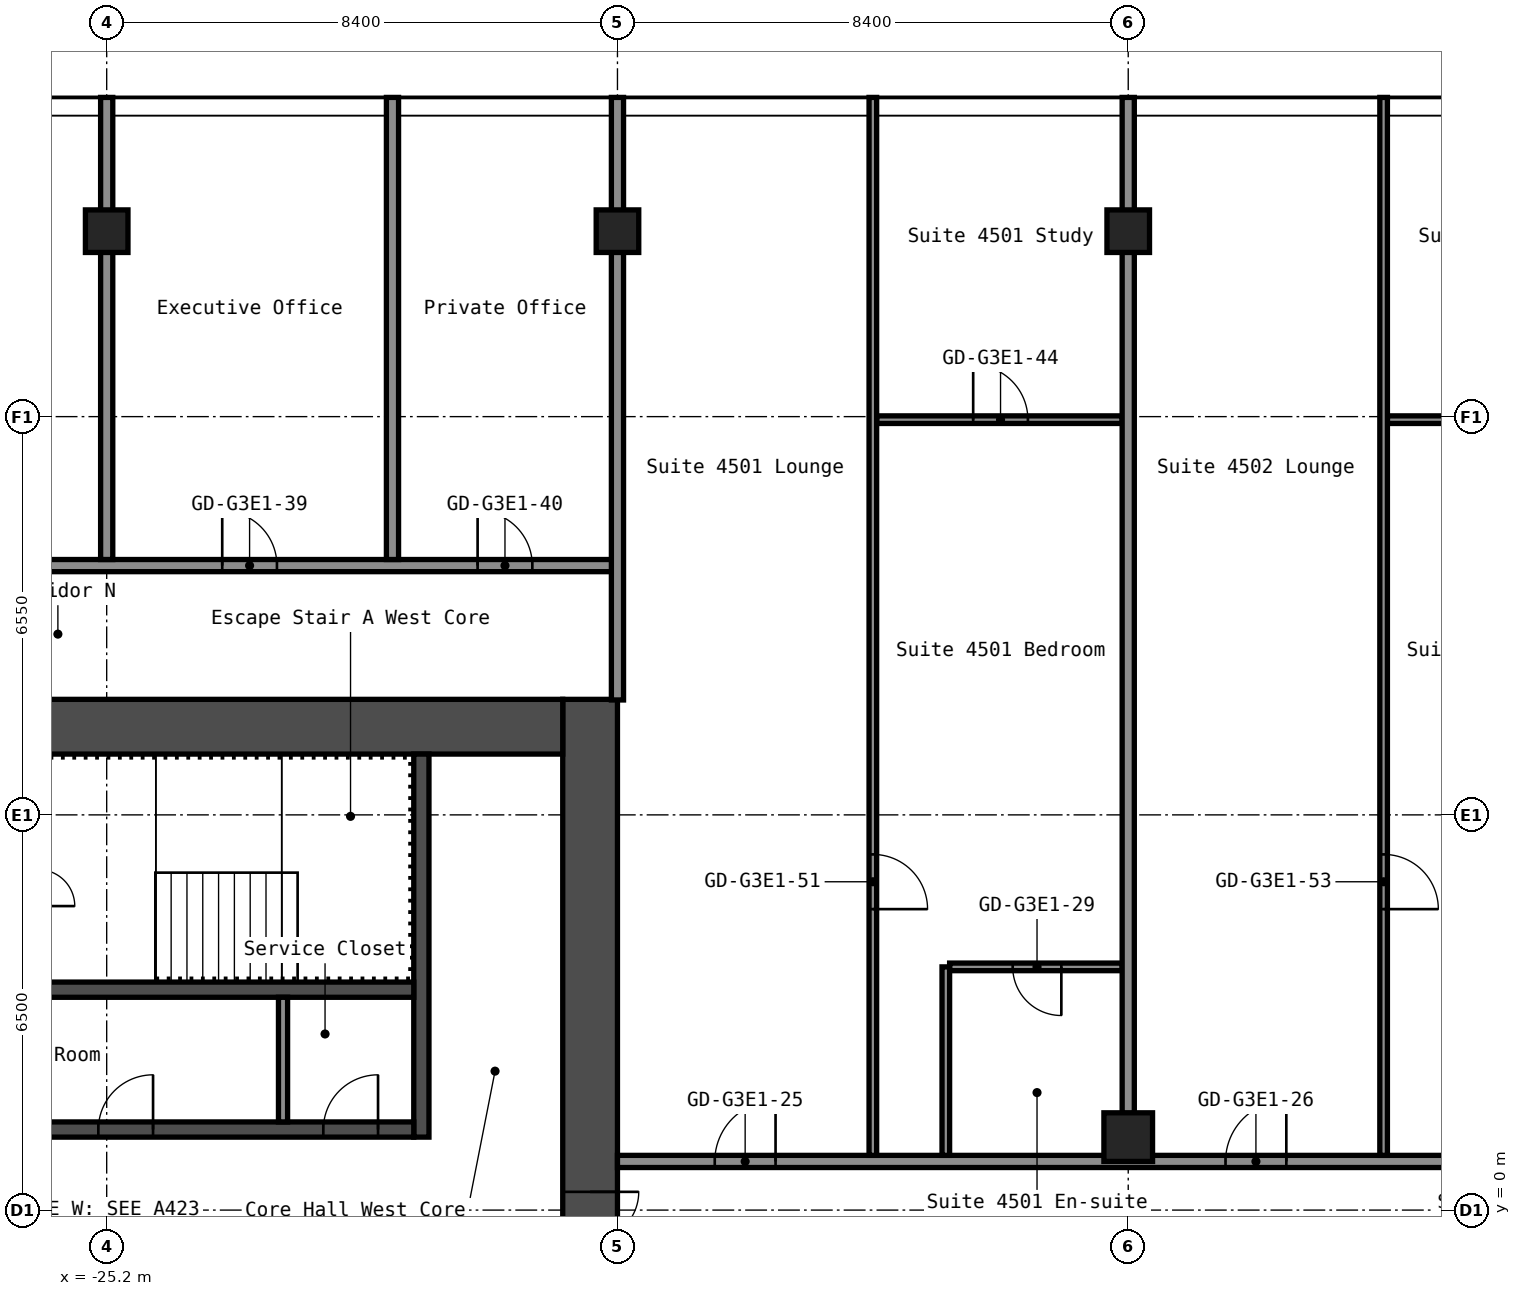
"""IFC4 building model, lengths in metres.
Left out: names, types, materials, properties, quantities, classifications, styles, units other than length and angle.
Written with IfcOpenShell. Run it as: python <this file> out.ifc"""

import sys

from ifc_helpers import new_model, si_unit, direction, frame, frame_2d, origin, origin_2d, place, context, subcontext, project, spatial, rectangle, hollow_rectangle, extrude, element, fill, save


model = new_model("IFC4")
c1 = context("Model", 3, precision=1e-05, world=origin(), true_north=direction((0.0, 1.0)))
c2 = subcontext(c1, "Body", "Model", "MODEL_VIEW")
j1 = project(units=[si_unit("LENGTHUNIT", "METRE"), si_unit("PLANEANGLEUNIT", "RADIAN")], contexts=[c1])
p1 = place(None, origin())
s1 = spatial("IfcSite", under=j1, at=p1, CompositionType="ELEMENT")
p2 = place(p1, origin())
s2 = spatial("IfcBuilding", under=s1, at=p2, CompositionType="ELEMENT")
p3 = place(p2, frame((0.0, 0.0, 159.8)))
s3 = spatial("IfcBuildingStorey", under=s2, at=p3, CompositionType="ELEMENT", Elevation=159.8)
for number, where, z_axis, x_axis in (
    (1, (-25.2, 16.1, 0.0), (0.0, 0.0, 1.0), (1.0, 0.0, 0.0)),
    (2, (-16.8, 16.1, 0.0), (0.0, 0.0, 1.0), (1.0, 0.0, 0.0)),
):
    element("IfcColumn", number, at=place(p3, frame(where, z_axis=z_axis, x_axis=x_axis)), inside=s3, PredefinedType="COLUMN", context=c2, shape_type="SweptSolid", body=[
        extrude(hollow_rectangle(XDim=0.7, YDim=0.7, WallThickness=0.028, at=origin_2d()), origin(), (0.0, 0.0, 1.0), 2.75),
    ])
p4 = place(p3, frame((-8.4, 1.2, 0.0), z_axis=(0.0, 0.0, 1.0), x_axis=(1.0, 0.0, 0.0)))
e3 = element("IfcColumn", 3, at=p4, inside=s3, PredefinedType="COLUMN", context=c2, shape_type="SweptSolid", body=[
    extrude(hollow_rectangle(XDim=0.8, YDim=0.8, WallThickness=0.032, at=origin_2d()), origin(), (0.0, 0.0, 1.0), 2.75),
])
p5 = place(p3, frame((-8.4, 16.1, 0.0), z_axis=(0.0, 0.0, 1.0), x_axis=(1.0, 0.0, 0.0)))
e4 = element("IfcColumn", 4, at=p5, inside=s3, PredefinedType="COLUMN", context=c2, shape_type="SweptSolid", body=[
    extrude(hollow_rectangle(XDim=0.7, YDim=0.7, WallThickness=0.028, at=origin_2d()), origin(), (0.0, 0.0, 1.0), 2.75),
])
p6 = place(p3, frame((-17.25, -8.4, 0.0), z_axis=(0.0, 0.0, 1.0), x_axis=(0.0, 1.0, 0.0)))
e5 = element("IfcWall", 5, at=p6, inside=s3, PredefinedType="SHEAR", context=c2, shape_type="SweptSolid", body=[
    extrude(rectangle(XDim=16.8, YDim=0.9, at=frame_2d((8.4, 0.0))), origin(), (0.0, 0.0, 1.0), 2.75),
])
p7 = place(p6, frame((7.1, 0.0, 0.0)))
e6 = element("IfcOpeningElement", 6, at=p7, cuts=e5, PredefinedType="OPENING", context=c2, shape_type="SweptSolid", body=[
    extrude(rectangle(XDim=1.6, YDim=2.1, at=frame_2d((0.8, 1.05))), frame((0.0, 0.46, 0.0), z_axis=(0.0, -1.0, 0.0), x_axis=(1.0, 0.0, 0.0)), (0.0, 0.0, 1.0), 0.92),
])
p8 = place(p3, frame((-32.7, 7.95, 0.0), z_axis=(0.0, 0.0, 1.0), x_axis=(1.0, 0.0, 0.0)))
e7 = element("IfcWall", 7, at=p8, inside=s3, PredefinedType="SHEAR", context=c2, shape_type="SweptSolid", body=[
    extrude(rectangle(XDim=15.0, YDim=0.9, at=frame_2d((7.5, 0.0))), origin(), (0.0, 0.0, 1.0), 2.75),
])
p9 = place(p8, frame((3.4, 0.0, 0.0)))
e8 = element("IfcOpeningElement", 8, at=p9, cuts=e7, PredefinedType="OPENING", context=c2, shape_type="SweptSolid", body=[
    extrude(rectangle(XDim=1.2, YDim=2.1, at=frame_2d((0.6, 1.05))), frame((0.0, 0.46, 0.0), z_axis=(0.0, -1.0, 0.0), x_axis=(1.0, 0.0, 0.0)), (0.0, 0.0, 1.0), 0.92),
])
p10 = place(p8, frame((0.75, 0.0, 0.0)))
e9 = element("IfcOpeningElement", 9, at=p10, cuts=e7, PredefinedType="OPENING", context=c2, shape_type="SweptSolid", body=[
    extrude(rectangle(XDim=0.9, YDim=2.1, at=frame_2d((0.45, 1.05))), frame((0.0, 0.46, 0.0), z_axis=(0.0, -1.0, 0.0), x_axis=(1.0, 0.0, 0.0)), (0.0, 0.0, 1.0), 0.92),
])
p11 = place(p3, frame((-20.025, 1.2, 0.0), z_axis=(0.0, 0.0, 1.0), x_axis=(0.0, 1.0, 0.0)))
e10 = element("IfcWall", 10, at=p11, inside=s3, PredefinedType="SHEAR", context=c2, shape_type="SweptSolid", body=[
    extrude(rectangle(XDim=6.3, YDim=0.25, at=frame_2d((3.15, 0.0))), origin(), (0.0, 0.0, 1.0), 2.75),
])
p12 = place(p3, frame((-27.65, 1.325, 0.0), z_axis=(0.0, 0.0, 1.0), x_axis=(1.0, 0.0, 0.0)))
e11 = element("IfcWall", 11, at=p12, inside=s3, PredefinedType="SHEAR", context=c2, shape_type="SweptSolid", body=[
    extrude(rectangle(XDim=7.5, YDim=0.25, at=frame_2d((3.75, 0.0))), origin(), (0.0, 0.0, 1.0), 2.75),
])
p13 = place(p12, frame((6.012, 0.0, 0.0)))
e12 = element("IfcOpeningElement", 12, at=p13, cuts=e11, PredefinedType="OPENING", context=c2, shape_type="SweptSolid", body=[
    extrude(rectangle(XDim=0.9, YDim=2.1, at=frame_2d((0.45, 1.05))), frame((0.0, 0.135, 0.0), z_axis=(0.0, -1.0, 0.0), x_axis=(1.0, 0.0, 0.0)), (0.0, 0.0, 1.0), 0.27),
])
p14 = place(p12, frame((2.312, 0.0, 0.0)))
e13 = element("IfcOpeningElement", 13, at=p14, cuts=e11, PredefinedType="OPENING", context=c2, shape_type="SweptSolid", body=[
    extrude(rectangle(XDim=0.9, YDim=2.1, at=frame_2d((0.45, 1.05))), frame((0.0, 0.135, 0.0), z_axis=(0.0, -1.0, 0.0), x_axis=(1.0, 0.0, 0.0)), (0.0, 0.0, 1.0), 0.27),
])
p15 = place(p3, frame((-27.65, 3.625, 0.0), z_axis=(0.0, 0.0, 1.0), x_axis=(1.0, 0.0, 0.0)))
e14 = element("IfcWall", 14, at=p15, inside=s3, PredefinedType="SHEAR", context=c2, shape_type="SweptSolid", body=[
    extrude(rectangle(XDim=7.5, YDim=0.25, at=frame_2d((3.75, 0.0))), origin(), (0.0, 0.0, 1.0), 2.75),
])
p16 = place(p3, frame((-22.3, 1.45, 0.0), z_axis=(0.0, 0.0, 1.0), x_axis=(0.0, 1.0, 0.0)))
e15 = element("IfcWall", 15, at=p16, inside=s3, PredefinedType="PARTITIONING", context=c2, shape_type="SweptSolid", body=[
    extrude(rectangle(XDim=2.05, YDim=0.15, at=frame_2d((1.025, 0.0))), origin(), (0.0, 0.0, 1.0), 2.75),
])
p17 = place(p3, frame((-16.8, 0.8, 0.0), z_axis=(0.0, 0.0, 1.0), x_axis=(1.0, 0.0, 0.0)))
e16 = element("IfcWall", 16, at=p17, inside=s3, PredefinedType="PARTITIONING", context=c2, shape_type="SweptSolid", body=[
    extrude(rectangle(XDim=33.6, YDim=0.2, at=frame_2d((16.8, 0.0))), origin(), (0.0, 0.0, 1.0), 2.75),
])
p18 = place(p17, frame((1.6, 0.0, 0.0)))
e17 = element("IfcOpeningElement", 17, at=p18, cuts=e16, PredefinedType="OPENING", context=c2, shape_type="SweptSolid", body=[
    extrude(rectangle(XDim=1.0, YDim=2.1, at=frame_2d((0.5, 1.05))), frame((0.0, 0.11, 0.0), z_axis=(0.0, -1.0, 0.0), x_axis=(1.0, 0.0, 0.0)), (0.0, 0.0, 1.0), 0.22),
])
p19 = place(p17, frame((10.0, 0.0, 0.0)))
e18 = element("IfcOpeningElement", 18, at=p19, cuts=e16, PredefinedType="OPENING", context=c2, shape_type="SweptSolid", body=[
    extrude(rectangle(XDim=1.0, YDim=2.1, at=frame_2d((0.5, 1.05))), frame((0.0, 0.11, 0.0), z_axis=(0.0, -1.0, 0.0), x_axis=(1.0, 0.0, 0.0)), (0.0, 0.0, 1.0), 0.22),
])
p20 = place(p17, frame((22.6, 0.0, 0.0)))
e19 = element("IfcOpeningElement", 19, at=p20, cuts=e16, PredefinedType="OPENING", context=c2, shape_type="SweptSolid", body=[
    extrude(rectangle(XDim=1.0, YDim=2.1, at=frame_2d((0.5, 1.05))), frame((0.0, 0.11, 0.0), z_axis=(0.0, -1.0, 0.0), x_axis=(1.0, 0.0, 0.0)), (0.0, 0.0, 1.0), 0.22),
])
p21 = place(p17, frame((27.1, 0.0, 0.0)))
e20 = element("IfcOpeningElement", 20, at=p21, cuts=e16, PredefinedType="OPENING", context=c2, shape_type="SweptSolid", body=[
    extrude(rectangle(XDim=1.0, YDim=2.1, at=frame_2d((0.5, 1.05))), frame((0.0, 0.11, 0.0), z_axis=(0.0, -1.0, 0.0), x_axis=(1.0, 0.0, 0.0)), (0.0, 0.0, 1.0), 0.22),
])
p22 = place(p3, frame((-11.337, 4.0, 0.0), z_axis=(0.0, 0.0, 1.0), x_axis=(1.0, 0.0, 0.0)))
e21 = element("IfcWall", 21, at=p22, inside=s3, PredefinedType="PARTITIONING", context=c2, shape_type="SweptSolid", body=[
    extrude(rectangle(XDim=2.837, YDim=0.125, at=frame_2d((1.419, 0.0))), origin(), (0.0, 0.0, 1.0), 2.75),
])
p23 = place(p22, frame((1.038, 0.0, 0.0)))
e22 = element("IfcOpeningElement", 22, at=p23, cuts=e21, PredefinedType="OPENING", context=c2, shape_type="SweptSolid", body=[
    extrude(rectangle(XDim=0.8, YDim=2.1, at=frame_2d((0.4, 1.05))), frame((0.0, 0.073, 0.0), z_axis=(0.0, -1.0, 0.0), x_axis=(1.0, 0.0, 0.0)), (0.0, 0.0, 1.0), 0.145),
])
p24 = place(p3, frame((-42.7, 10.6, 0.0), z_axis=(0.0, 0.0, 1.0), x_axis=(1.0, 0.0, 0.0)))
e23 = element("IfcWall", 23, at=p24, inside=s3, PredefinedType="PARTITIONING", context=c2, shape_type="SweptSolid", body=[
    extrude(rectangle(XDim=25.9, YDim=0.2, at=frame_2d((12.95, 0.0))), origin(), (0.0, 0.0, 1.0), 2.75),
])
p25 = place(p24, frame((1.61, 0.0, 0.0)))
e24 = element("IfcOpeningElement", 24, at=p25, cuts=e23, PredefinedType="OPENING", context=c2, shape_type="SweptSolid", body=[
    extrude(rectangle(XDim=0.9, YDim=2.1, at=frame_2d((0.45, 1.05))), frame((0.0, 0.11, 0.0), z_axis=(0.0, -1.0, 0.0), x_axis=(1.0, 0.0, 0.0)), (0.0, 0.0, 1.0), 0.22),
])
p26 = place(p24, frame((6.01, 0.0, 0.0)))
e25 = element("IfcOpeningElement", 25, at=p26, cuts=e23, PredefinedType="OPENING", context=c2, shape_type="SweptSolid", body=[
    extrude(rectangle(XDim=0.9, YDim=2.1, at=frame_2d((0.45, 1.05))), frame((0.0, 0.11, 0.0), z_axis=(0.0, -1.0, 0.0), x_axis=(1.0, 0.0, 0.0)), (0.0, 0.0, 1.0), 0.22),
])
p27 = place(p24, frame((12.8, 0.0, 0.0)))
e26 = element("IfcOpeningElement", 26, at=p27, cuts=e23, PredefinedType="OPENING", context=c2, shape_type="SweptSolid", body=[
    extrude(rectangle(XDim=1.0, YDim=2.1, at=frame_2d((0.5, 1.05))), frame((0.0, 0.11, 0.0), z_axis=(0.0, -1.0, 0.0), x_axis=(1.0, 0.0, 0.0)), (0.0, 0.0, 1.0), 0.22),
])
p28 = place(p24, frame((19.4, 0.0, 0.0)))
e27 = element("IfcOpeningElement", 27, at=p28, cuts=e23, PredefinedType="OPENING", context=c2, shape_type="SweptSolid", body=[
    extrude(rectangle(XDim=0.9, YDim=2.1, at=frame_2d((0.45, 1.05))), frame((0.0, 0.11, 0.0), z_axis=(0.0, -1.0, 0.0), x_axis=(1.0, 0.0, 0.0)), (0.0, 0.0, 1.0), 0.22),
])
p29 = place(p24, frame((23.6, 0.0, 0.0)))
e28 = element("IfcOpeningElement", 28, at=p29, cuts=e23, PredefinedType="OPENING", context=c2, shape_type="SweptSolid", body=[
    extrude(rectangle(XDim=0.9, YDim=2.1, at=frame_2d((0.45, 1.05))), frame((0.0, 0.11, 0.0), z_axis=(0.0, -1.0, 0.0), x_axis=(1.0, 0.0, 0.0)), (0.0, 0.0, 1.0), 0.22),
])
p30 = place(p3, frame((-12.538, 13.0, 0.0), z_axis=(0.0, 0.0, 1.0), x_axis=(1.0, 0.0, 0.0)))
e29 = element("IfcWall", 29, at=p30, inside=s3, PredefinedType="PARTITIONING", context=c2, shape_type="SweptSolid", body=[
    extrude(rectangle(XDim=4.038, YDim=0.125, at=frame_2d((2.019, 0.0))), origin(), (0.0, 0.0, 1.0), 2.75),
])
p31 = place(p30, frame((1.587, 0.0, 0.0)))
e30 = element("IfcOpeningElement", 30, at=p31, cuts=e29, PredefinedType="OPENING", context=c2, shape_type="SweptSolid", body=[
    extrude(rectangle(XDim=0.9, YDim=2.1, at=frame_2d((0.45, 1.05))), frame((0.0, 0.073, 0.0), z_axis=(0.0, -1.0, 0.0), x_axis=(1.0, 0.0, 0.0)), (0.0, 0.0, 1.0), 0.145),
])
p32 = place(p3, frame((-4.137, 13.0, 0.0), z_axis=(0.0, 0.0, 1.0), x_axis=(1.0, 0.0, 0.0)))
e31 = element("IfcWall", 31, at=p32, inside=s3, PredefinedType="PARTITIONING", context=c2, shape_type="SweptSolid", body=[
    extrude(rectangle(XDim=8.275, YDim=0.125, at=frame_2d((4.137, 0.0))), origin(), (0.0, 0.0, 1.0), 2.75),
])
p33 = place(p32, frame((1.587, 0.0, 0.0)))
e32 = element("IfcOpeningElement", 32, at=p33, cuts=e31, PredefinedType="OPENING", context=c2, shape_type="SweptSolid", body=[
    extrude(rectangle(XDim=0.9, YDim=2.1, at=frame_2d((0.45, 1.05))), frame((0.0, 0.073, 0.0), z_axis=(0.0, -1.0, 0.0), x_axis=(1.0, 0.0, 0.0)), (0.0, 0.0, 1.0), 0.145),
])
p34 = place(p32, frame((5.788, 0.0, 0.0)))
e33 = element("IfcOpeningElement", 33, at=p34, cuts=e31, PredefinedType="OPENING", context=c2, shape_type="SweptSolid", body=[
    extrude(rectangle(XDim=0.9, YDim=2.1, at=frame_2d((0.45, 1.05))), frame((0.0, 0.073, 0.0), z_axis=(0.0, -1.0, 0.0), x_axis=(1.0, 0.0, 0.0)), (0.0, 0.0, 1.0), 0.145),
])
for number, where, z_axis, x_axis in (
    (34, (-25.2, 10.7, 0.0), (0.0, 0.0, 1.0), (0.0, 1.0, 0.0)),
    (35, (-20.5, 10.7, 0.0), (0.0, 0.0, 1.0), (0.0, 1.0, 0.0)),
):
    element("IfcWall", number, at=place(p3, frame(where, z_axis=z_axis, x_axis=x_axis)), inside=s3, PredefinedType="PARTITIONING", context=c2, shape_type="SweptSolid", body=[
        extrude(rectangle(XDim=7.6, YDim=0.2, at=frame_2d((3.8, 0.0))), origin(), (0.0, 0.0, 1.0), 2.75),
    ])
p35 = place(p3, frame((-16.8, 8.39, 0.0), z_axis=(0.0, 0.0, 1.0), x_axis=(0.0, 1.0, 0.0)))
e36 = element("IfcWall", 36, at=p35, inside=s3, PredefinedType="PARTITIONING", context=c2, shape_type="SweptSolid", body=[
    extrude(rectangle(XDim=9.91, YDim=0.2, at=frame_2d((4.955, 0.0))), origin(), (0.0, 0.0, 1.0), 2.75),
])
p36 = place(p3, frame((-12.6, 0.9, 0.0), z_axis=(0.0, 0.0, 1.0), x_axis=(0.0, 1.0, 0.0)))
e37 = element("IfcWall", 37, at=p36, inside=s3, PredefinedType="PARTITIONING", context=c2, shape_type="SweptSolid", body=[
    extrude(rectangle(XDim=17.4, YDim=0.125, at=frame_2d((8.7, 0.0))), origin(), (0.0, 0.0, 1.0), 2.75),
])
p37 = place(p36, frame((4.05, 0.0, 0.0)))
e38 = element("IfcOpeningElement", 38, at=p37, cuts=e37, PredefinedType="OPENING", context=c2, shape_type="SweptSolid", body=[
    extrude(rectangle(XDim=0.9, YDim=2.1, at=frame_2d((0.45, 1.05))), frame((0.0, 0.073, 0.0), z_axis=(0.0, -1.0, 0.0), x_axis=(1.0, 0.0, 0.0)), (0.0, 0.0, 1.0), 0.145),
])
p38 = place(p3, frame((-11.4, 0.9, 0.0), z_axis=(0.0, 0.0, 1.0), x_axis=(0.0, 1.0, 0.0)))
e39 = element("IfcWall", 39, at=p38, inside=s3, PredefinedType="PARTITIONING", context=c2, shape_type="SweptSolid", body=[
    extrude(rectangle(XDim=3.1, YDim=0.125, at=frame_2d((1.55, 0.0))), origin(), (0.0, 0.0, 1.0), 2.75),
])
p39 = place(p3, frame((-8.4, 1.59, 0.0), z_axis=(0.0, 0.0, 1.0), x_axis=(0.0, 1.0, 0.0)))
e40 = element("IfcWall", 40, at=p39, inside=s3, PredefinedType="PARTITIONING", context=c2, shape_type="SweptSolid", body=[
    extrude(rectangle(XDim=16.71, YDim=0.2, at=frame_2d((8.355, 0.0))), origin(), (0.0, 0.0, 1.0), 2.75),
])
p40 = place(p3, frame((-4.2, 0.9, 0.0), z_axis=(0.0, 0.0, 1.0), x_axis=(0.0, 1.0, 0.0)))
e41 = element("IfcWall", 41, at=p40, inside=s3, PredefinedType="PARTITIONING", context=c2, shape_type="SweptSolid", body=[
    extrude(rectangle(XDim=17.4, YDim=0.125, at=frame_2d((8.7, 0.0))), origin(), (0.0, 0.0, 1.0), 2.75),
])
p41 = place(p40, frame((4.05, 0.0, 0.0)))
e42 = element("IfcOpeningElement", 42, at=p41, cuts=e41, PredefinedType="OPENING", context=c2, shape_type="SweptSolid", body=[
    extrude(rectangle(XDim=0.9, YDim=2.1, at=frame_2d((0.45, 1.05))), frame((0.0, 0.073, 0.0), z_axis=(0.0, -1.0, 0.0), x_axis=(1.0, 0.0, 0.0)), (0.0, 0.0, 1.0), 0.145),
])
p42 = place(p7, origin())
e43 = element("IfcDoor", 43, at=p42, inside=s3, OperationType="DOUBLE_DOOR_SINGLE_SWING", PredefinedType="DOOR", context=c2, shape_type="SweptSolid", body=[
    extrude(rectangle(XDim=1.6, YDim=2.1, at=frame_2d((0.8, 1.05))), frame((0.0, 0.025, 0.0), z_axis=(0.0, -1.0, 0.0), x_axis=(1.0, 0.0, 0.0)), (0.0, 0.0, 1.0), 0.05),
])
fill(e6, e43)
p43 = place(p13, origin())
e44 = element("IfcDoor", 44, at=p43, inside=s3, OperationType="SINGLE_SWING_LEFT", PredefinedType="DOOR", context=c2, shape_type="SweptSolid", body=[
    extrude(rectangle(XDim=0.9, YDim=2.1, at=frame_2d((0.45, 1.05))), frame((0.0, 0.025, 0.0), z_axis=(0.0, -1.0, 0.0), x_axis=(1.0, 0.0, 0.0)), (0.0, 0.0, 1.0), 0.05),
])
fill(e12, e44)
p44 = place(p14, origin())
e45 = element("IfcDoor", 45, at=p44, inside=s3, OperationType="SINGLE_SWING_LEFT", PredefinedType="DOOR", context=c2, shape_type="SweptSolid", body=[
    extrude(rectangle(XDim=0.9, YDim=2.1, at=frame_2d((0.45, 1.05))), frame((0.0, 0.025, 0.0), z_axis=(0.0, -1.0, 0.0), x_axis=(1.0, 0.0, 0.0)), (0.0, 0.0, 1.0), 0.05),
])
fill(e13, e45)
p45 = place(p18, origin())
e46 = element("IfcDoor", 46, at=p45, inside=s3, OperationType="SINGLE_SWING_LEFT", PredefinedType="DOOR", context=c2, shape_type="SweptSolid", body=[
    extrude(rectangle(XDim=1.0, YDim=2.1, at=frame_2d((0.5, 1.05))), frame((0.0, 0.025, 0.0), z_axis=(0.0, -1.0, 0.0), x_axis=(1.0, 0.0, 0.0)), (0.0, 0.0, 1.0), 0.05),
])
fill(e17, e46)
p46 = place(p19, origin())
e47 = element("IfcDoor", 47, at=p46, inside=s3, OperationType="SINGLE_SWING_LEFT", PredefinedType="DOOR", context=c2, shape_type="SweptSolid", body=[
    extrude(rectangle(XDim=1.0, YDim=2.1, at=frame_2d((0.5, 1.05))), frame((0.0, 0.025, 0.0), z_axis=(0.0, -1.0, 0.0), x_axis=(1.0, 0.0, 0.0)), (0.0, 0.0, 1.0), 0.05),
])
fill(e18, e47)
p47 = place(p23, origin())
e48 = element("IfcDoor", 48, at=p47, inside=s3, OperationType="SINGLE_SWING_RIGHT", PredefinedType="DOOR", context=c2, shape_type="SweptSolid", body=[
    extrude(rectangle(XDim=0.8, YDim=2.1, at=frame_2d((0.4, 1.05))), frame((0.0, 0.025, 0.0), z_axis=(0.0, -1.0, 0.0), x_axis=(1.0, 0.0, 0.0)), (0.0, 0.0, 1.0), 0.05),
])
fill(e22, e48)
p48 = place(p28, origin())
e49 = element("IfcDoor", 49, at=p48, inside=s3, OperationType="SINGLE_SWING_RIGHT", PredefinedType="DOOR", context=c2, shape_type="SweptSolid", body=[
    extrude(rectangle(XDim=0.9, YDim=2.1, at=frame_2d((0.45, 1.05))), frame((0.0, 0.025, 0.0), z_axis=(0.0, -1.0, 0.0), x_axis=(1.0, 0.0, 0.0)), (0.0, 0.0, 1.0), 0.05),
])
fill(e27, e49)
p49 = place(p29, origin())
e50 = element("IfcDoor", 50, at=p49, inside=s3, OperationType="SINGLE_SWING_RIGHT", PredefinedType="DOOR", context=c2, shape_type="SweptSolid", body=[
    extrude(rectangle(XDim=0.9, YDim=2.1, at=frame_2d((0.45, 1.05))), frame((0.0, 0.025, 0.0), z_axis=(0.0, -1.0, 0.0), x_axis=(1.0, 0.0, 0.0)), (0.0, 0.0, 1.0), 0.05),
])
fill(e28, e50)
p50 = place(p31, origin())
e51 = element("IfcDoor", 51, at=p50, inside=s3, OperationType="SINGLE_SWING_RIGHT", PredefinedType="DOOR", context=c2, shape_type="SweptSolid", body=[
    extrude(rectangle(XDim=0.9, YDim=2.1, at=frame_2d((0.45, 1.05))), frame((0.0, 0.025, 0.0), z_axis=(0.0, -1.0, 0.0), x_axis=(1.0, 0.0, 0.0)), (0.0, 0.0, 1.0), 0.05),
])
fill(e30, e51)
p51 = place(p37, origin())
e52 = element("IfcDoor", 52, at=p51, inside=s3, OperationType="SINGLE_SWING_LEFT", PredefinedType="DOOR", context=c2, shape_type="SweptSolid", body=[
    extrude(rectangle(XDim=0.9, YDim=2.1, at=frame_2d((0.45, 1.05))), frame((0.0, 0.025, 0.0), z_axis=(0.0, -1.0, 0.0), x_axis=(1.0, 0.0, 0.0)), (0.0, 0.0, 1.0), 0.05),
])
fill(e38, e52)
p52 = place(p41, origin())
e53 = element("IfcDoor", 53, at=p52, inside=s3, OperationType="SINGLE_SWING_LEFT", PredefinedType="DOOR", context=c2, shape_type="SweptSolid", body=[
    extrude(rectangle(XDim=0.9, YDim=2.1, at=frame_2d((0.45, 1.05))), frame((0.0, 0.025, 0.0), z_axis=(0.0, -1.0, 0.0), x_axis=(1.0, 0.0, 0.0)), (0.0, 0.0, 1.0), 0.05),
])
fill(e42, e53)
save(model, sys.argv[1])
